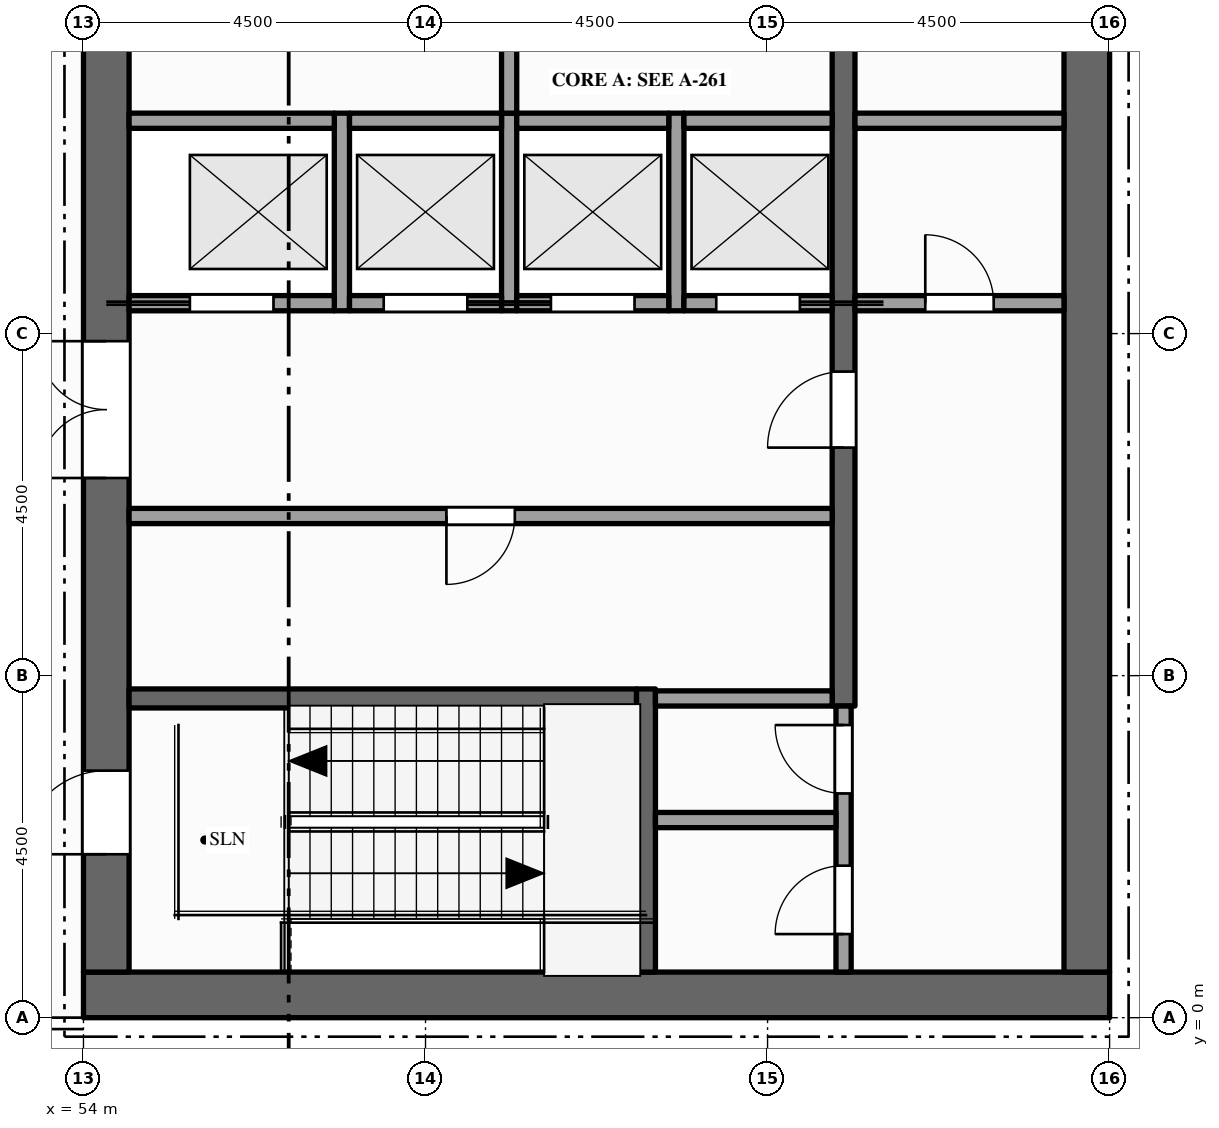
"""IFC4 building model, lengths in metres.
Left out: names, types, materials, properties, quantities, classifications, styles, units other than length and angle.
Written with IfcOpenShell. Run it as: python <this file> out.ifc"""

import sys

from ifc_helpers import new_model, si_unit, direction, frame, frame_2d, origin, place, context, subcontext, project, spatial, rectangle, extrude, element, fill, save


model = new_model("IFC4")
c1 = context("Model", 3, precision=1e-05, world=origin(), true_north=direction((0.0, 1.0)))
c2 = subcontext(c1, "Body", "Model", "MODEL_VIEW")
j1 = project(units=[si_unit("LENGTHUNIT", "METRE"), si_unit("PLANEANGLEUNIT", "RADIAN")], contexts=[c1])
p1 = place(None, origin())
s1 = spatial("IfcSite", under=j1, at=p1, CompositionType="ELEMENT")
p2 = place(p1, origin())
s2 = spatial("IfcBuilding", under=s1, at=p2, CompositionType="ELEMENT")
p3 = place(p2, frame((0.0, 0.0, 336.5)))
s3 = spatial("IfcBuildingStorey", under=s2, at=p3, CompositionType="ELEMENT", Elevation=336.5)
p4 = place(p3, frame((67.5, 0.3, -0.15), z_axis=(0.0, 0.0, 1.0), x_axis=(-1.0, 0.0, 0.0)))
e1 = element("IfcWall", 1, at=p4, inside=s3, PredefinedType="SHEAR", context=c2, shape_type="SweptSolid", body=[
    extrude(rectangle(XDim=13.5, YDim=0.6, at=frame_2d((6.75, 0.0))), origin(), (0.0, 0.0, 1.0), 4.5),
])
p5 = place(p3, frame((54.3, 0.6, -0.15), z_axis=(0.0, 0.0, 1.0), x_axis=(0.0, 1.0, 0.0)))
e2 = element("IfcWall", 2, at=p5, inside=s3, PredefinedType="SHEAR", context=c2, shape_type="SweptSolid", body=[
    extrude(rectangle(XDim=21.3, YDim=0.6, at=frame_2d((10.65, 0.0))), origin(), (0.0, 0.0, 1.0), 4.5),
])
p6 = place(p5, frame((6.5, 0.0, 0.15)))
e3 = element("IfcOpeningElement", 3, at=p6, cuts=e2, PredefinedType="OPENING", context=c2, shape_type="SweptSolid", body=[
    extrude(rectangle(XDim=1.8, YDim=2.1, at=frame_2d((0.9, 1.05))), frame((0.0, 0.31, 0.0), z_axis=(0.0, -1.0, 0.0), x_axis=(1.0, 0.0, 0.0)), (0.0, 0.0, 1.0), 0.62),
])
p7 = place(p5, frame((12.55, 0.0, 0.15)))
e4 = element("IfcOpeningElement", 4, at=p7, cuts=e2, PredefinedType="OPENING", context=c2, shape_type="SweptSolid", body=[
    extrude(rectangle(XDim=1.1, YDim=2.1, at=frame_2d((0.55, 1.05))), frame((0.0, 0.31, 0.0), z_axis=(0.0, -1.0, 0.0), x_axis=(1.0, 0.0, 0.0)), (0.0, 0.0, 1.0), 0.62),
])
p8 = place(p5, frame((1.55, 0.0, 0.15)))
e5 = element("IfcOpeningElement", 5, at=p8, cuts=e2, PredefinedType="OPENING", context=c2, shape_type="SweptSolid", body=[
    extrude(rectangle(XDim=1.1, YDim=2.1, at=frame_2d((0.55, 1.05))), frame((0.0, 0.31, 0.0), z_axis=(0.0, -1.0, 0.0), x_axis=(1.0, 0.0, 0.0)), (0.0, 0.0, 1.0), 0.62),
])
p9 = place(p5, frame((18.75, 0.0, 0.15)))
e6 = element("IfcOpeningElement", 6, at=p9, cuts=e2, PredefinedType="OPENING", context=c2, shape_type="SweptSolid", body=[
    extrude(rectangle(XDim=1.1, YDim=2.1, at=frame_2d((0.55, 1.05))), frame((0.0, 0.31, 0.0), z_axis=(0.0, -1.0, 0.0), x_axis=(1.0, 0.0, 0.0)), (0.0, 0.0, 1.0), 0.62),
])
p10 = place(p3, frame((67.2, 0.6, -0.15), z_axis=(0.0, 0.0, 1.0), x_axis=(0.0, 1.0, 0.0)))
e7 = element("IfcWall", 7, at=p10, inside=s3, PredefinedType="SHEAR", context=c2, shape_type="SweptSolid", body=[
    extrude(rectangle(XDim=21.3, YDim=0.6, at=frame_2d((10.65, 0.0))), origin(), (0.0, 0.0, 1.0), 4.5),
])
for number, where, z_axis, x_axis in (
    (8, (57.4, 9.3, 0.0), (0.0, 0.0, 1.0), (0.0, 1.0, 0.0)),
    (9, (59.6, 9.3, 0.0), (0.0, 0.0, 1.0), (0.0, 1.0, 0.0)),
):
    element("IfcWall", number, at=place(p3, frame(where, z_axis=z_axis, x_axis=x_axis)), inside=s3, PredefinedType="SOLIDWALL", context=c2, shape_type="SweptSolid", body=[
        extrude(rectangle(XDim=2.6, YDim=0.2, at=frame_2d((1.3, 0.0))), origin(), (0.0, 0.0, 1.0), 4.35),
    ])
p11 = place(p3, frame((59.6, 11.9, 0.0), z_axis=(0.0, 0.0, 1.0), x_axis=(0.0, 1.0, 0.0)))
e10 = element("IfcWall", 10, at=p11, inside=s3, PredefinedType="PARTITIONING", context=c2, shape_type="SweptSolid", body=[
    extrude(rectangle(XDim=3.6, YDim=0.2, at=frame_2d((1.8, 0.0))), origin(), (0.0, 0.0, 1.0), 4.35),
])
p12 = place(p11, frame((1.3, 0.0, 0.0)))
e11 = element("IfcOpeningElement", 11, at=p12, cuts=e10, PredefinedType="OPENING", context=c2, shape_type="SweptSolid", body=[
    extrude(rectangle(XDim=1.0, YDim=2.1, at=frame_2d((0.5, 1.05))), frame((0.0, 0.11, 0.0), z_axis=(0.0, -1.0, 0.0), x_axis=(1.0, 0.0, 0.0)), (0.0, 0.0, 1.0), 0.22),
])
p13 = place(p3, frame((61.4, 0.6, 0.0), z_axis=(0.0, 0.0, 1.0), x_axis=(0.0, 1.0, 0.0)))
e12 = element("IfcWall", 12, at=p13, inside=s3, PredefinedType="SHEAR", context=c2, shape_type="SweptSolid", body=[
    extrude(rectangle(XDim=3.725, YDim=0.25, at=frame_2d((1.862, 0.0))), origin(), (0.0, 0.0, 1.0), 4.35),
])
p14 = place(p3, frame((61.8, 9.3, 0.0), z_axis=(0.0, 0.0, 1.0), x_axis=(0.0, 1.0, 0.0)))
e13 = element("IfcWall", 13, at=p14, inside=s3, PredefinedType="SOLIDWALL", context=c2, shape_type="SweptSolid", body=[
    extrude(rectangle(XDim=2.6, YDim=0.2, at=frame_2d((1.3, 0.0))), origin(), (0.0, 0.0, 1.0), 4.35),
])
p15 = place(p3, frame((64.0, 0.6, 0.0), z_axis=(0.0, 0.0, 1.0), x_axis=(0.0, 1.0, 0.0)))
e14 = element("IfcWall", 14, at=p15, inside=s3, PredefinedType="PARTITIONING", context=c2, shape_type="SweptSolid", body=[
    extrude(rectangle(XDim=3.5, YDim=0.2, at=frame_2d((1.75, 0.0))), origin(), (0.0, 0.0, 1.0), 4.35),
])
p16 = place(p15, frame((0.5, 0.0, 0.0)))
e15 = element("IfcOpeningElement", 15, at=p16, cuts=e14, PredefinedType="OPENING", context=c2, shape_type="SweptSolid", body=[
    extrude(rectangle(XDim=0.9, YDim=2.1, at=frame_2d((0.45, 1.05))), frame((0.0, 0.11, 0.0), z_axis=(0.0, -1.0, 0.0), x_axis=(1.0, 0.0, 0.0)), (0.0, 0.0, 1.0), 0.22),
])
p17 = place(p15, frame((2.35, 0.0, 0.0)))
e16 = element("IfcOpeningElement", 16, at=p17, cuts=e14, PredefinedType="OPENING", context=c2, shape_type="SweptSolid", body=[
    extrude(rectangle(XDim=0.9, YDim=2.1, at=frame_2d((0.45, 1.05))), frame((0.0, 0.11, 0.0), z_axis=(0.0, -1.0, 0.0), x_axis=(1.0, 0.0, 0.0)), (0.0, 0.0, 1.0), 0.22),
])
p18 = place(p3, frame((64.0, 4.1, 0.0), z_axis=(0.0, 0.0, 1.0), x_axis=(0.0, 1.0, 0.0)))
e17 = element("IfcWall", 17, at=p18, inside=s3, PredefinedType="SHEAR", context=c2, shape_type="SweptSolid", body=[
    extrude(rectangle(XDim=14.5, YDim=0.3, at=frame_2d((7.25, 0.0))), origin(), (0.0, 0.0, 1.0), 4.35),
])
p19 = place(p18, frame((3.4, 0.0, 0.0)))
e18 = element("IfcOpeningElement", 18, at=p19, cuts=e17, PredefinedType="OPENING", context=c2, shape_type="SweptSolid", body=[
    extrude(rectangle(XDim=1.0, YDim=2.1, at=frame_2d((0.5, 1.05))), frame((0.0, 0.16, 0.0), z_axis=(0.0, -1.0, 0.0), x_axis=(1.0, 0.0, 0.0)), (0.0, 0.0, 1.0), 0.32),
])
p20 = place(p18, frame((9.1, 0.0, 0.0)))
e19 = element("IfcOpeningElement", 19, at=p20, cuts=e17, PredefinedType="OPENING", context=c2, shape_type="SweptSolid", body=[
    extrude(rectangle(XDim=1.0, YDim=2.1, at=frame_2d((0.5, 1.05))), frame((0.0, 0.16, 0.0), z_axis=(0.0, -1.0, 0.0), x_axis=(1.0, 0.0, 0.0)), (0.0, 0.0, 1.0), 0.32),
])
p21 = place(p3, frame((61.525, 2.6, 0.0), z_axis=(0.0, 0.0, 1.0), x_axis=(1.0, 0.0, 0.0)))
e20 = element("IfcWall", 20, at=p21, inside=s3, PredefinedType="PARTITIONING", context=c2, shape_type="SweptSolid", body=[
    extrude(rectangle(XDim=2.375, YDim=0.2, at=frame_2d((1.188, 0.0))), origin(), (0.0, 0.0, 1.0), 4.35),
])
p22 = place(p3, frame((54.6, 4.2, 0.0), z_axis=(0.0, 0.0, 1.0), x_axis=(1.0, 0.0, 0.0)))
e21 = element("IfcWall", 21, at=p22, inside=s3, PredefinedType="SHEAR", context=c2, shape_type="SweptSolid", body=[
    extrude(rectangle(XDim=6.675, YDim=0.25, at=frame_2d((3.337, 0.0))), origin(), (0.0, 0.0, 1.0), 4.35),
])
p23 = place(p3, frame((61.525, 4.2, 0.0), z_axis=(0.0, 0.0, 1.0), x_axis=(1.0, 0.0, 0.0)))
e22 = element("IfcWall", 22, at=p23, inside=s3, PredefinedType="PARTITIONING", context=c2, shape_type="SweptSolid", body=[
    extrude(rectangle(XDim=2.325, YDim=0.2, at=frame_2d((1.163, 0.0))), origin(), (0.0, 0.0, 1.0), 4.35),
])
p24 = place(p3, frame((54.6, 6.6, 0.0), z_axis=(0.0, 0.0, 1.0), x_axis=(1.0, 0.0, 0.0)))
e23 = element("IfcWall", 23, at=p24, inside=s3, PredefinedType="PARTITIONING", context=c2, shape_type="SweptSolid", body=[
    extrude(rectangle(XDim=9.25, YDim=0.2, at=frame_2d((4.625, 0.0))), origin(), (0.0, 0.0, 1.0), 4.35),
])
p25 = place(p24, frame((4.175, 0.0, 0.0)))
e24 = element("IfcOpeningElement", 24, at=p25, cuts=e23, PredefinedType="OPENING", context=c2, shape_type="SweptSolid", body=[
    extrude(rectangle(XDim=0.9, YDim=2.1, at=frame_2d((0.45, 1.05))), frame((0.0, 0.11, 0.0), z_axis=(0.0, -1.0, 0.0), x_axis=(1.0, 0.0, 0.0)), (0.0, 0.0, 1.0), 0.22),
])
p26 = place(p3, frame((54.6, 9.4, 0.0), z_axis=(0.0, 0.0, 1.0), x_axis=(1.0, 0.0, 0.0)))
e25 = element("IfcWall", 25, at=p26, inside=s3, PredefinedType="SOLIDWALL", context=c2, shape_type="SweptSolid", body=[
    extrude(rectangle(XDim=2.7, YDim=0.2, at=frame_2d((1.35, 0.0))), origin(), (0.0, 0.0, 1.0), 4.35),
])
p27 = place(p26, frame((0.8, 0.0, 0.012)))
e26 = element("IfcOpeningElement", 26, at=p27, cuts=e25, PredefinedType="OPENING", context=c2, shape_type="SweptSolid", body=[
    extrude(rectangle(XDim=1.1, YDim=2.1, at=frame_2d((0.55, 1.05))), frame((0.0, 0.11, 0.0), z_axis=(0.0, -1.0, 0.0), x_axis=(1.0, 0.0, 0.0)), (0.0, 0.0, 1.0), 0.22),
])
p28 = place(p3, frame((57.5, 9.4, 0.0), z_axis=(0.0, 0.0, 1.0), x_axis=(1.0, 0.0, 0.0)))
e27 = element("IfcWall", 27, at=p28, inside=s3, PredefinedType="SOLIDWALL", context=c2, shape_type="SweptSolid", body=[
    extrude(rectangle(XDim=2.0, YDim=0.2, at=frame_2d((1.0, 0.0))), origin(), (0.0, 0.0, 1.0), 4.35),
])
p29 = place(p28, frame((0.45, 0.0, 0.012)))
e28 = element("IfcOpeningElement", 28, at=p29, cuts=e27, PredefinedType="OPENING", context=c2, shape_type="SweptSolid", body=[
    extrude(rectangle(XDim=1.1, YDim=2.1, at=frame_2d((0.55, 1.05))), frame((0.0, 0.11, 0.0), z_axis=(0.0, -1.0, 0.0), x_axis=(1.0, 0.0, 0.0)), (0.0, 0.0, 1.0), 0.22),
])
p30 = place(p3, frame((59.7, 9.4, 0.0), z_axis=(0.0, 0.0, 1.0), x_axis=(1.0, 0.0, 0.0)))
e29 = element("IfcWall", 29, at=p30, inside=s3, PredefinedType="SOLIDWALL", context=c2, shape_type="SweptSolid", body=[
    extrude(rectangle(XDim=2.0, YDim=0.2, at=frame_2d((1.0, 0.0))), origin(), (0.0, 0.0, 1.0), 4.35),
])
p31 = place(p30, frame((0.45, 0.0, 0.012)))
e30 = element("IfcOpeningElement", 30, at=p31, cuts=e29, PredefinedType="OPENING", context=c2, shape_type="SweptSolid", body=[
    extrude(rectangle(XDim=1.1, YDim=2.1, at=frame_2d((0.55, 1.05))), frame((0.0, 0.11, 0.0), z_axis=(0.0, -1.0, 0.0), x_axis=(1.0, 0.0, 0.0)), (0.0, 0.0, 1.0), 0.22),
])
p32 = place(p3, frame((61.9, 9.4, 0.0), z_axis=(0.0, 0.0, 1.0), x_axis=(1.0, 0.0, 0.0)))
e31 = element("IfcWall", 31, at=p32, inside=s3, PredefinedType="SOLIDWALL", context=c2, shape_type="SweptSolid", body=[
    extrude(rectangle(XDim=1.95, YDim=0.2, at=frame_2d((0.975, 0.0))), origin(), (0.0, 0.0, 1.0), 4.35),
])
p33 = place(p32, frame((0.425, 0.0, 0.012)))
e32 = element("IfcOpeningElement", 32, at=p33, cuts=e31, PredefinedType="OPENING", context=c2, shape_type="SweptSolid", body=[
    extrude(rectangle(XDim=1.1, YDim=2.1, at=frame_2d((0.55, 1.05))), frame((0.0, 0.11, 0.0), z_axis=(0.0, -1.0, 0.0), x_axis=(1.0, 0.0, 0.0)), (0.0, 0.0, 1.0), 0.22),
])
p34 = place(p3, frame((64.15, 9.4, 0.0), z_axis=(0.0, 0.0, 1.0), x_axis=(1.0, 0.0, 0.0)))
e33 = element("IfcWall", 33, at=p34, inside=s3, PredefinedType="PARTITIONING", context=c2, shape_type="SweptSolid", body=[
    extrude(rectangle(XDim=2.75, YDim=0.2, at=frame_2d((1.375, 0.0))), origin(), (0.0, 0.0, 1.0), 4.35),
])
p35 = place(p34, frame((0.925, 0.0, 0.0)))
e34 = element("IfcOpeningElement", 34, at=p35, cuts=e33, PredefinedType="OPENING", context=c2, shape_type="SweptSolid", body=[
    extrude(rectangle(XDim=0.9, YDim=2.1, at=frame_2d((0.45, 1.05))), frame((0.0, 0.11, 0.0), z_axis=(0.0, -1.0, 0.0), x_axis=(1.0, 0.0, 0.0)), (0.0, 0.0, 1.0), 0.22),
])
p36 = place(p3, frame((54.6, 11.8, 0.0), z_axis=(0.0, 0.0, 1.0), x_axis=(1.0, 0.0, 0.0)))
e35 = element("IfcWall", 35, at=p36, inside=s3, PredefinedType="SOLIDWALL", context=c2, shape_type="SweptSolid", body=[
    extrude(rectangle(XDim=2.7, YDim=0.2, at=frame_2d((1.35, 0.0))), origin(), (0.0, 0.0, 1.0), 4.35),
])
for number, where, z_axis, x_axis in (
    (36, (57.5, 11.8, 0.0), (0.0, 0.0, 1.0), (1.0, 0.0, 0.0)),
    (37, (59.7, 11.8, 0.0), (0.0, 0.0, 1.0), (1.0, 0.0, 0.0)),
):
    element("IfcWall", number, at=place(p3, frame(where, z_axis=z_axis, x_axis=x_axis)), inside=s3, PredefinedType="SOLIDWALL", context=c2, shape_type="SweptSolid", body=[
        extrude(rectangle(XDim=2.0, YDim=0.2, at=frame_2d((1.0, 0.0))), origin(), (0.0, 0.0, 1.0), 4.35),
    ])
p37 = place(p3, frame((61.9, 11.8, 0.0), z_axis=(0.0, 0.0, 1.0), x_axis=(1.0, 0.0, 0.0)))
e38 = element("IfcWall", 38, at=p37, inside=s3, PredefinedType="SOLIDWALL", context=c2, shape_type="SweptSolid", body=[
    extrude(rectangle(XDim=1.95, YDim=0.2, at=frame_2d((0.975, 0.0))), origin(), (0.0, 0.0, 1.0), 4.35),
])
p38 = place(p3, frame((64.15, 11.8, 0.0), z_axis=(0.0, 0.0, 1.0), x_axis=(1.0, 0.0, 0.0)))
e39 = element("IfcWall", 39, at=p38, inside=s3, PredefinedType="PARTITIONING", context=c2, shape_type="SweptSolid", body=[
    extrude(rectangle(XDim=2.75, YDim=0.2, at=frame_2d((1.375, 0.0))), origin(), (0.0, 0.0, 1.0), 4.35),
])
p39 = place(p27, origin())
e40 = element("IfcDoor", 40, at=p39, inside=s3, OperationType="SLIDING_TO_LEFT", PredefinedType="DOOR", context=c2, shape_type="SweptSolid", body=[
    extrude(rectangle(XDim=1.1, YDim=2.1, at=frame_2d((0.55, 1.05))), frame((0.0, 0.025, 0.0), z_axis=(0.0, -1.0, 0.0), x_axis=(1.0, 0.0, 0.0)), (0.0, 0.0, 1.0), 0.05),
])
fill(e26, e40)
p40 = place(p29, origin())
e41 = element("IfcDoor", 41, at=p40, inside=s3, OperationType="SLIDING_TO_RIGHT", PredefinedType="DOOR", context=c2, shape_type="SweptSolid", body=[
    extrude(rectangle(XDim=1.1, YDim=2.1, at=frame_2d((0.55, 1.05))), frame((0.0, 0.025, 0.0), z_axis=(0.0, -1.0, 0.0), x_axis=(1.0, 0.0, 0.0)), (0.0, 0.0, 1.0), 0.05),
])
fill(e28, e41)
p41 = place(p31, origin())
e42 = element("IfcDoor", 42, at=p41, inside=s3, OperationType="SLIDING_TO_LEFT", PredefinedType="DOOR", context=c2, shape_type="SweptSolid", body=[
    extrude(rectangle(XDim=1.1, YDim=2.1, at=frame_2d((0.55, 1.05))), frame((0.0, 0.025, 0.0), z_axis=(0.0, -1.0, 0.0), x_axis=(1.0, 0.0, 0.0)), (0.0, 0.0, 1.0), 0.05),
])
fill(e30, e42)
p42 = place(p33, origin())
e43 = element("IfcDoor", 43, at=p42, inside=s3, OperationType="SLIDING_TO_RIGHT", PredefinedType="DOOR", context=c2, shape_type="SweptSolid", body=[
    extrude(rectangle(XDim=1.1, YDim=2.1, at=frame_2d((0.55, 1.05))), frame((0.0, 0.025, 0.0), z_axis=(0.0, -1.0, 0.0), x_axis=(1.0, 0.0, 0.0)), (0.0, 0.0, 1.0), 0.05),
])
fill(e32, e43)
p43 = place(p6, origin())
e44 = element("IfcDoor", 44, at=p43, inside=s3, OperationType="DOUBLE_DOOR_SINGLE_SWING", PredefinedType="DOOR", context=c2, shape_type="SweptSolid", body=[
    extrude(rectangle(XDim=1.8, YDim=2.1, at=frame_2d((0.9, 1.05))), frame((0.0, 0.025, 0.0), z_axis=(0.0, -1.0, 0.0), x_axis=(1.0, 0.0, 0.0)), (0.0, 0.0, 1.0), 0.05),
])
fill(e3, e44)
p44 = place(p19, origin())
e45 = element("IfcDoor", 45, at=p44, inside=s3, OperationType="SINGLE_SWING_LEFT", PredefinedType="DOOR", context=c2, shape_type="SweptSolid", body=[
    extrude(rectangle(XDim=1.0, YDim=2.1, at=frame_2d((0.5, 1.05))), frame((0.0, 0.025, 0.0), z_axis=(0.0, -1.0, 0.0), x_axis=(1.0, 0.0, 0.0)), (0.0, 0.0, 1.0), 0.05),
])
fill(e18, e45)
p45 = place(p35, origin())
e46 = element("IfcDoor", 46, at=p45, inside=s3, OperationType="SINGLE_SWING_LEFT", PredefinedType="DOOR", context=c2, shape_type="SweptSolid", body=[
    extrude(rectangle(XDim=0.9, YDim=2.1, at=frame_2d((0.45, 1.05))), frame((0.0, 0.025, 0.0), z_axis=(0.0, -1.0, 0.0), x_axis=(1.0, 0.0, 0.0)), (0.0, 0.0, 1.0), 0.05),
])
fill(e34, e46)
p46 = place(p8, origin())
e47 = element("IfcDoor", 47, at=p46, inside=s3, OperationType="SINGLE_SWING_LEFT", PredefinedType="DOOR", context=c2, shape_type="SweptSolid", body=[
    extrude(rectangle(XDim=1.1, YDim=2.1, at=frame_2d((0.55, 1.05))), frame((0.0, 0.025, 0.0), z_axis=(0.0, -1.0, 0.0), x_axis=(1.0, 0.0, 0.0)), (0.0, 0.0, 1.0), 0.05),
])
fill(e5, e47)
p47 = place(p16, origin())
e48 = element("IfcDoor", 48, at=p47, inside=s3, OperationType="SINGLE_SWING_LEFT", PredefinedType="DOOR", context=c2, shape_type="SweptSolid", body=[
    extrude(rectangle(XDim=0.9, YDim=2.1, at=frame_2d((0.45, 1.05))), frame((0.0, 0.025, 0.0), z_axis=(0.0, -1.0, 0.0), x_axis=(1.0, 0.0, 0.0)), (0.0, 0.0, 1.0), 0.05),
])
fill(e15, e48)
p48 = place(p17, origin())
e49 = element("IfcDoor", 49, at=p48, inside=s3, OperationType="SINGLE_SWING_RIGHT", PredefinedType="DOOR", context=c2, shape_type="SweptSolid", body=[
    extrude(rectangle(XDim=0.9, YDim=2.1, at=frame_2d((0.45, 1.05))), frame((0.0, 0.025, 0.0), z_axis=(0.0, -1.0, 0.0), x_axis=(1.0, 0.0, 0.0)), (0.0, 0.0, 1.0), 0.05),
])
fill(e16, e49)
p49 = place(p25, origin())
e50 = element("IfcDoor", 50, at=p49, inside=s3, OperationType="SINGLE_SWING_LEFT", PredefinedType="DOOR", context=c2, shape_type="SweptSolid", body=[
    extrude(rectangle(XDim=0.9, YDim=2.1, at=frame_2d((0.45, 1.05))), frame((0.0, 0.025, 0.0), z_axis=(0.0, -1.0, 0.0), x_axis=(1.0, 0.0, 0.0)), (0.0, 0.0, 1.0), 0.05),
])
fill(e24, e50)
save(model, sys.argv[1])
